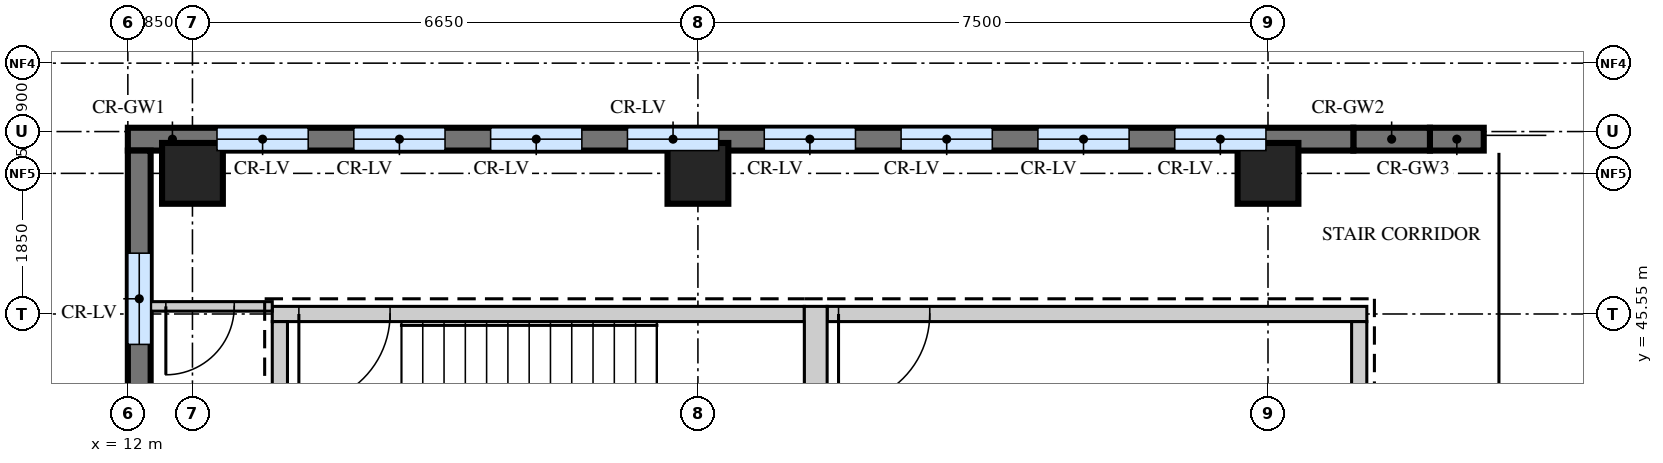
"""IFC4 building model, lengths in metres.
Left out: names, types, materials, properties, quantities, classifications, styles, units other than length and angle.
Written with IfcOpenShell. Run it as: python <this file> out.ifc"""

import sys

from ifc_helpers import new_model, si_unit, direction, frame, frame_2d, origin, origin_2d, place, context, subcontext, project, spatial, rectangle, extrude, source, transform, mapped, element, fill, save


model = new_model("IFC4")
c1 = context("Model", 3, precision=1e-05, world=origin(), true_north=direction((0.0, 1.0)))
c2 = subcontext(c1, "Body", "Model", "MODEL_VIEW")
j1 = project(units=[si_unit("LENGTHUNIT", "METRE"), si_unit("PLANEANGLEUNIT", "RADIAN")], contexts=[c1])
p1 = place(None, origin())
s1 = spatial("IfcSite", under=j1, at=p1, CompositionType="ELEMENT")
p2 = place(p1, origin())
s2 = spatial("IfcBuilding", under=s1, at=p2, CompositionType="ELEMENT")
p3 = place(p2, frame((0.0, 0.0, 343.7)))
s3 = spatial("IfcBuildingStorey", under=s2, at=p3, CompositionType="ELEMENT", Elevation=343.7)
m1 = source(origin(), c2, "Body", "SweptSolid", [
    extrude(rectangle(XDim=7.0, YDim=0.2, at=frame_2d((3.5, 0.0))), origin(), (0.0, 0.0, 1.0), 4.25),
])
p4 = place(p3, frame((13.9, 45.55, 0.0), z_axis=(0.0, 0.0, 1.0), x_axis=(1.0, 0.0, 0.0)))
e1 = element("IfcWall", 1, at=p4, inside=s3, PredefinedType="SHEAR", context=c2, shape_type="MappedRepresentation", body=[
    mapped(m1, transform((0.0, 0.0, 0.0))),
])
m2 = source(origin(), c2, "Body", "SweptSolid", [
    extrude(rectangle(XDim=1.2, YDim=2.1, at=frame_2d((0.6, 1.05))), frame((0.0, 0.11, 0.0), z_axis=(0.0, -1.0, 0.0), x_axis=(1.0, 0.0, 0.0)), (0.0, 0.0, 1.0), 0.22),
])
p5 = place(p4, frame((0.35, 0.0, 0.0)))
e2 = element("IfcOpeningElement", 2, at=p5, cuts=e1, PredefinedType="OPENING", context=c2, shape_type="MappedRepresentation", body=[
    mapped(m2, transform((0.0, 0.0, 0.0))),
])
m3 = source(origin(), c2, "Body", "SweptSolid", [
    extrude(rectangle(XDim=7.1, YDim=0.2, at=frame_2d((3.55, 0.0))), origin(), (0.0, 0.0, 1.0), 4.25),
])
p6 = place(p3, frame((21.2, 45.55, 0.0), z_axis=(0.0, 0.0, 1.0), x_axis=(1.0, 0.0, 0.0)))
e3 = element("IfcWall", 3, at=p6, inside=s3, PredefinedType="SHEAR", context=c2, shape_type="MappedRepresentation", body=[
    mapped(m3, transform((0.0, 0.0, 0.0))),
])
p7 = place(p6, frame((0.15, 0.0, 0.0)))
e4 = element("IfcOpeningElement", 4, at=p7, cuts=e3, PredefinedType="OPENING", context=c2, shape_type="MappedRepresentation", body=[
    mapped(m2, transform((0.0, 0.0, 0.0))),
])
m4 = source(origin(), c2, "Body", "SweptSolid", [
    extrude(rectangle(XDim=3.75, YDim=0.3, at=frame_2d((1.875, 0.0))), origin(), (0.0, 0.0, 1.0), 4.25),
])
p8 = place(p3, frame((21.05, 41.9, 0.0), z_axis=(0.0, 0.0, 1.0), x_axis=(0.0, 1.0, 0.0)))
e5 = element("IfcWall", 5, at=p8, inside=s3, PredefinedType="SHEAR", context=c2, shape_type="MappedRepresentation", body=[
    mapped(m4, transform((0.0, 0.0, 0.0))),
])
m5 = source(origin(), c2, "Body", "SweptSolid", [
    extrude(rectangle(XDim=3.35, YDim=0.2, at=frame_2d((1.675, 0.0))), origin(), (0.0, 0.0, 1.0), 4.25),
])
for number, where, z_axis, x_axis in (
    (6, (14.0, 42.1, 0.0), (0.0, 0.0, 1.0), (0.0, 1.0, 0.0)),
    (7, (28.2, 42.1, 0.0), (0.0, 0.0, 1.0), (0.0, 1.0, 0.0)),
):
    element("IfcWall", number, at=place(p3, frame(where, z_axis=z_axis, x_axis=x_axis)), inside=s3, PredefinedType="SHEAR", context=c2, shape_type="MappedRepresentation", body=[
        mapped(m5, transform((0.0, 0.0, 0.0))),
    ])
m6 = source(origin(), c2, "Body", "SweptSolid", [
    extrude(rectangle(XDim=0.8, YDim=0.8, at=origin_2d()), origin(), (0.0, 0.0, 1.0), 4.5),
])
for number, where, z_axis, x_axis in (
    (8, (12.85, 47.4, 0.0), (0.0, 0.0, 1.0), (1.0, 0.0, 0.0)),
    (9, (19.5, 47.4, 0.0), (0.0, 0.0, 1.0), (1.0, 0.0, 0.0)),
    (10, (27.0, 47.4, 0.0), (0.0, 0.0, 1.0), (1.0, 0.0, 0.0)),
):
    element("IfcColumn", number, at=place(p3, frame(where, z_axis=z_axis, x_axis=x_axis)), inside=s3, PredefinedType="COLUMN", context=c2, shape_type="MappedRepresentation", body=[
        mapped(m6, transform((0.0, 0.0, 0.0))),
    ])
m7 = source(origin(), c2, "Body", "SweptSolid", [
    extrude(rectangle(XDim=0.708, YDim=0.3, at=frame_2d((0.354, 0.0))), origin(), (0.0, 0.0, 1.0), 2.3),
])
p9 = place(p3, frame((29.838, 47.85, 0.0), z_axis=(0.0, 0.0, 1.0), x_axis=(-1.0, 0.0, 0.0)))
e11 = element("IfcWall", 11, at=p9, inside=s3, PredefinedType="SOLIDWALL", context=c2, shape_type="MappedRepresentation", body=[
    mapped(m7, transform((0.0, 0.0, 0.0))),
])
m8 = source(origin(), c2, "Body", "SweptSolid", [
    extrude(rectangle(XDim=1.008, YDim=0.3, at=frame_2d((0.504, 0.0))), origin(), (0.0, 0.0, 1.0), 4.05),
])
p10 = place(p3, frame((29.131, 47.85, 0.0), z_axis=(0.0, 0.0, 1.0), x_axis=(-1.0, 0.0, 0.0)))
e12 = element("IfcWall", 12, at=p10, inside=s3, PredefinedType="SOLIDWALL", context=c2, shape_type="MappedRepresentation", body=[
    mapped(m8, transform((0.0, 0.0, 0.0))),
])
m9 = source(origin(), c2, "Body", "SweptSolid", [
    extrude(rectangle(XDim=16.123, YDim=0.3, at=frame_2d((8.062, 0.0))), origin(), (0.0, 0.0, 1.0), 4.5),
])
p11 = place(p3, frame((28.123, 47.85, 0.0), z_axis=(0.0, 0.0, 1.0), x_axis=(-1.0, 0.0, 0.0)))
e13 = element("IfcWall", 13, at=p11, inside=s3, PredefinedType="SOLIDWALL", context=c2, shape_type="MappedRepresentation", body=[
    mapped(m9, transform((0.0, 0.0, 0.0))),
])
m10 = source(origin(), c2, "Body", "SweptSolid", [
    extrude(rectangle(XDim=1.2, YDim=2.4, at=frame_2d((0.6, 1.2))), frame((0.0, 0.16, 0.0), z_axis=(0.0, -1.0, 0.0), x_axis=(1.0, 0.0, 0.0)), (0.0, 0.0, 1.0), 0.32),
])
p12 = place(p11, frame((1.15, 0.0, 0.9)))
e14 = element("IfcOpeningElement", 14, at=p12, cuts=e13, PredefinedType="OPENING", context=c2, shape_type="MappedRepresentation", body=[
    mapped(m10, transform((0.0, 0.0, 0.0))),
])
p13 = place(p11, frame((2.95, 0.0, 0.9)))
e15 = element("IfcOpeningElement", 15, at=p13, cuts=e13, PredefinedType="OPENING", context=c2, shape_type="MappedRepresentation", body=[
    mapped(m10, transform((0.0, 0.0, 0.0))),
])
p14 = place(p11, frame((4.75, 0.0, 0.9)))
e16 = element("IfcOpeningElement", 16, at=p14, cuts=e13, PredefinedType="OPENING", context=c2, shape_type="MappedRepresentation", body=[
    mapped(m10, transform((0.0, 0.0, 0.0))),
])
p15 = place(p11, frame((6.55, 0.0, 0.9)))
e17 = element("IfcOpeningElement", 17, at=p15, cuts=e13, PredefinedType="OPENING", context=c2, shape_type="MappedRepresentation", body=[
    mapped(m10, transform((0.0, 0.0, 0.0))),
])
p16 = place(p11, frame((8.35, 0.0, 0.9)))
e18 = element("IfcOpeningElement", 18, at=p16, cuts=e13, PredefinedType="OPENING", context=c2, shape_type="MappedRepresentation", body=[
    mapped(m10, transform((0.0, 0.0, 0.0))),
])
p17 = place(p11, frame((10.15, 0.0, 0.9)))
e19 = element("IfcOpeningElement", 19, at=p17, cuts=e13, PredefinedType="OPENING", context=c2, shape_type="MappedRepresentation", body=[
    mapped(m10, transform((0.0, 0.0, 0.0))),
])
p18 = place(p11, frame((11.95, 0.0, 0.9)))
e20 = element("IfcOpeningElement", 20, at=p18, cuts=e13, PredefinedType="OPENING", context=c2, shape_type="MappedRepresentation", body=[
    mapped(m10, transform((0.0, 0.0, 0.0))),
])
p19 = place(p11, frame((13.75, 0.0, 0.9)))
e21 = element("IfcOpeningElement", 21, at=p19, cuts=e13, PredefinedType="OPENING", context=c2, shape_type="MappedRepresentation", body=[
    mapped(m10, transform((0.0, 0.0, 0.0))),
])
m11 = source(origin(), c2, "Body", "SweptSolid", [
    extrude(rectangle(XDim=5.7, YDim=0.3, at=frame_2d((2.85, 0.0))), origin(), (0.0, 0.0, 1.0), 4.5),
])
p20 = place(p3, frame((12.15, 47.7, 0.0), z_axis=(0.0, 0.0, 1.0), x_axis=(0.0, -1.0, 0.0)))
e22 = element("IfcWall", 22, at=p20, inside=s3, PredefinedType="SOLIDWALL", context=c2, shape_type="MappedRepresentation", body=[
    mapped(m11, transform((0.0, 0.0, 0.0))),
])
p21 = place(p20, frame((1.35, 0.0, 0.9)))
e23 = element("IfcOpeningElement", 23, at=p21, cuts=e22, PredefinedType="OPENING", context=c2, shape_type="MappedRepresentation", body=[
    mapped(m10, transform((0.0, 0.0, 0.0))),
])
p22 = place(p20, frame((3.15, 0.0, 0.9)))
e24 = element("IfcOpeningElement", 24, at=p22, cuts=e22, PredefinedType="OPENING", context=c2, shape_type="MappedRepresentation", body=[
    mapped(m10, transform((0.0, 0.0, 0.0))),
])
m12 = source(origin(), c2, "Body", "SweptSolid", [
    extrude(rectangle(XDim=1.6, YDim=0.125, at=frame_2d((0.8, 0.0))), origin(), (0.0, 0.0, 1.0), 4.3),
])
p23 = place(p3, frame((12.3, 45.65, 0.0), z_axis=(0.0, 0.0, 1.0), x_axis=(1.0, 0.0, 0.0)))
e25 = element("IfcWall", 25, at=p23, inside=s3, PredefinedType="PARTITIONING", context=c2, shape_type="MappedRepresentation", body=[
    mapped(m12, transform((0.0, 0.0, 0.0))),
])
m13 = source(origin(), c2, "Body", "SweptSolid", [
    extrude(rectangle(XDim=0.9, YDim=2.1, at=frame_2d((0.45, 1.05))), frame((0.0, 0.073, 0.0), z_axis=(0.0, -1.0, 0.0), x_axis=(1.0, 0.0, 0.0)), (0.0, 0.0, 1.0), 0.145),
])
p24 = place(p23, frame((0.2, 0.0, 0.0)))
e26 = element("IfcOpeningElement", 26, at=p24, cuts=e25, PredefinedType="OPENING", context=c2, shape_type="MappedRepresentation", body=[
    mapped(m13, transform((0.0, 0.0, 0.0))),
])
m14 = source(origin(), c2, "Body", "SweptSolid", [
    extrude(rectangle(XDim=1.2, YDim=2.4, at=frame_2d((0.6, 1.2))), frame((0.0, 0.03, 0.0), z_axis=(0.0, -1.0, 0.0), x_axis=(1.0, 0.0, 0.0)), (0.0, 0.0, 1.0), 0.06),
])
p25 = place(p12, origin())
e27 = element("IfcWindow", 27, at=p25, inside=s3, PartitioningType="SINGLE_PANEL", PredefinedType="WINDOW", context=c2, shape_type="MappedRepresentation", body=[
    mapped(m14, transform((0.0, 0.0, 0.0))),
])
fill(e14, e27)
p26 = place(p13, origin())
e28 = element("IfcWindow", 28, at=p26, inside=s3, PartitioningType="SINGLE_PANEL", PredefinedType="WINDOW", context=c2, shape_type="MappedRepresentation", body=[
    mapped(m14, transform((0.0, 0.0, 0.0))),
])
fill(e15, e28)
p27 = place(p14, origin())
e29 = element("IfcWindow", 29, at=p27, inside=s3, PartitioningType="SINGLE_PANEL", PredefinedType="WINDOW", context=c2, shape_type="MappedRepresentation", body=[
    mapped(m14, transform((0.0, 0.0, 0.0))),
])
fill(e16, e29)
p28 = place(p15, origin())
e30 = element("IfcWindow", 30, at=p28, inside=s3, PartitioningType="SINGLE_PANEL", PredefinedType="WINDOW", context=c2, shape_type="MappedRepresentation", body=[
    mapped(m14, transform((0.0, 0.0, 0.0))),
])
fill(e17, e30)
p29 = place(p16, origin())
e31 = element("IfcWindow", 31, at=p29, inside=s3, PartitioningType="SINGLE_PANEL", PredefinedType="WINDOW", context=c2, shape_type="MappedRepresentation", body=[
    mapped(m14, transform((0.0, 0.0, 0.0))),
])
fill(e18, e31)
p30 = place(p17, origin())
e32 = element("IfcWindow", 32, at=p30, inside=s3, PartitioningType="SINGLE_PANEL", PredefinedType="WINDOW", context=c2, shape_type="MappedRepresentation", body=[
    mapped(m14, transform((0.0, 0.0, 0.0))),
])
fill(e19, e32)
p31 = place(p18, origin())
e33 = element("IfcWindow", 33, at=p31, inside=s3, PartitioningType="SINGLE_PANEL", PredefinedType="WINDOW", context=c2, shape_type="MappedRepresentation", body=[
    mapped(m14, transform((0.0, 0.0, 0.0))),
])
fill(e20, e33)
p32 = place(p19, origin())
e34 = element("IfcWindow", 34, at=p32, inside=s3, PartitioningType="SINGLE_PANEL", PredefinedType="WINDOW", context=c2, shape_type="MappedRepresentation", body=[
    mapped(m14, transform((0.0, 0.0, 0.0))),
])
fill(e21, e34)
p33 = place(p21, origin())
e35 = element("IfcWindow", 35, at=p33, inside=s3, PartitioningType="SINGLE_PANEL", PredefinedType="WINDOW", context=c2, shape_type="MappedRepresentation", body=[
    mapped(m14, transform((0.0, 0.0, 0.0))),
])
fill(e23, e35)
m15 = source(origin(), c2, "Body", "SweptSolid", [
    extrude(rectangle(XDim=0.9, YDim=2.1, at=frame_2d((0.45, 1.05))), frame((0.0, 0.025, 0.0), z_axis=(0.0, -1.0, 0.0), x_axis=(1.0, 0.0, 0.0)), (0.0, 0.0, 1.0), 0.05),
])
p34 = place(p24, origin())
e36 = element("IfcDoor", 36, at=p34, inside=s3, OperationType="SINGLE_SWING_LEFT", PredefinedType="DOOR", context=c2, shape_type="MappedRepresentation", body=[
    mapped(m15, transform((0.0, 0.0, 0.0))),
])
fill(e26, e36)
m16 = source(origin(), c2, "Body", "SweptSolid", [
    extrude(rectangle(XDim=1.2, YDim=2.1, at=frame_2d((0.6, 1.05))), frame((0.0, 0.025, 0.0), z_axis=(0.0, -1.0, 0.0), x_axis=(1.0, 0.0, 0.0)), (0.0, 0.0, 1.0), 0.05),
])
p35 = place(p5, origin())
e37 = element("IfcDoor", 37, at=p35, inside=s3, OperationType="SINGLE_SWING_LEFT", PredefinedType="DOOR", context=c2, shape_type="MappedRepresentation", body=[
    mapped(m16, transform((0.0, 0.0, 0.0))),
])
fill(e2, e37)
p36 = place(p7, origin())
e38 = element("IfcDoor", 38, at=p36, inside=s3, OperationType="SINGLE_SWING_LEFT", PredefinedType="DOOR", context=c2, shape_type="MappedRepresentation", body=[
    mapped(m16, transform((0.0, 0.0, 0.0))),
])
fill(e4, e38)
save(model, sys.argv[1])
